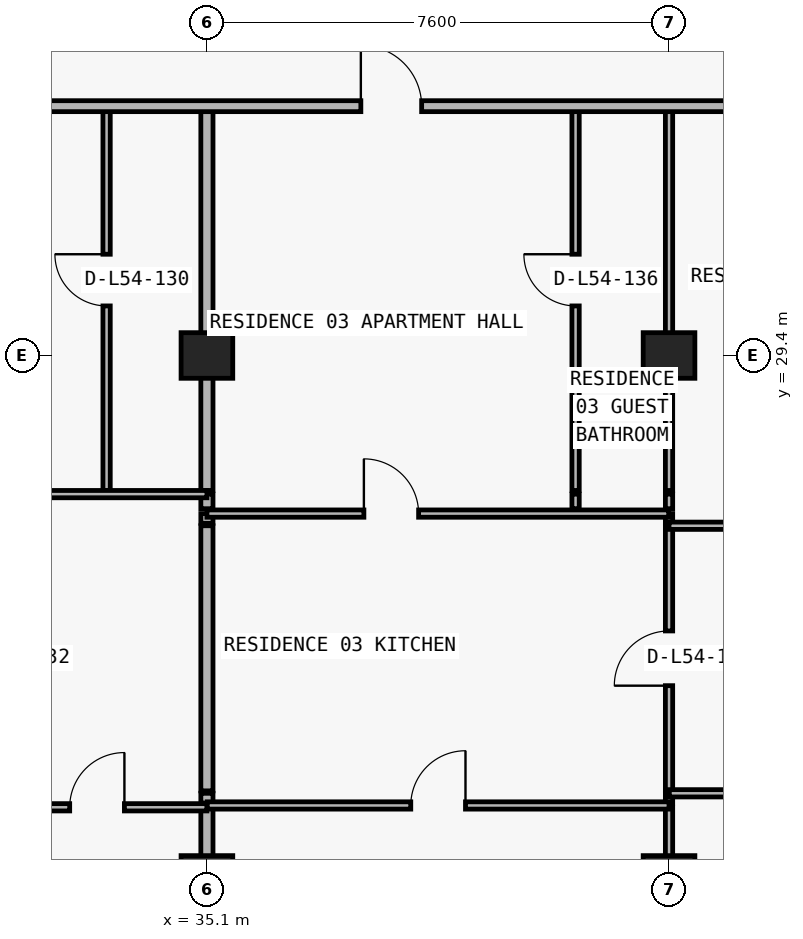
"""IFC4 building model, lengths in metres.
Left out: names, types, materials, properties, quantities, classifications, styles, units other than length and angle.
Written with IfcOpenShell. Run it as: python <this file> out.ifc"""

import sys

from ifc_helpers import new_model, si_unit, direction, frame, frame_2d, origin, origin_2d, place, context, subcontext, project, spatial, rectangle, extrude, element, fill, save


model = new_model("IFC4")
c1 = context("Model", 3, precision=1e-05, world=origin(), true_north=direction((0.0, 1.0)))
c2 = subcontext(c1, "Body", "Model", "MODEL_VIEW")
j1 = project(units=[si_unit("LENGTHUNIT", "METRE"), si_unit("PLANEANGLEUNIT", "RADIAN")], contexts=[c1])
p1 = place(None, origin())
s1 = spatial("IfcSite", under=j1, at=p1, CompositionType="ELEMENT")
p2 = place(p1, origin())
s2 = spatial("IfcBuilding", under=s1, at=p2, CompositionType="ELEMENT")
p3 = place(p2, frame((0.0, 0.0, 195.0)))
s3 = spatial("IfcBuildingStorey", under=s2, at=p3, CompositionType="ELEMENT", Elevation=195.0)
for number, where, z_axis, x_axis in (
    (1, (35.1, 20.8, 0.0), (0.0, 0.0, 1.0), (1.0, 0.0, 0.0)),
    (2, (42.7, 20.8, 0.0), (0.0, 0.0, 1.0), (1.0, 0.0, 0.0)),
    (3, (35.1, 29.4, 0.0), (0.0, 0.0, 1.0), (1.0, 0.0, 0.0)),
    (4, (42.7, 29.4, 0.0), (0.0, 0.0, 1.0), (1.0, 0.0, 0.0)),
):
    element("IfcColumn", number, at=place(p3, frame(where, z_axis=z_axis, x_axis=x_axis)), inside=s3, PredefinedType="COLUMN", context=c2, shape_type="SweptSolid", body=[
        extrude(rectangle(XDim=0.85, YDim=0.75, at=origin_2d()), origin(), (0.0, 0.0, 1.0), 3.05),
    ])
p4 = place(p3, frame((33.45, 27.18, 0.0), z_axis=(0.0, 0.0, 1.0), x_axis=(0.0, 1.0, 0.0)))
e5 = element("IfcWall", 5, at=p4, inside=s3, PredefinedType="PARTITIONING", context=c2, shape_type="SweptSolid", body=[
    extrude(rectangle(XDim=6.32, YDim=0.12, at=frame_2d((3.16, 0.0))), origin(), (0.0, 0.0, 1.0), 3.05),
])
p5 = place(p4, frame((3.035, 0.0, 0.0)))
e6 = element("IfcOpeningElement", 6, at=p5, cuts=e5, PredefinedType="OPENING", context=c2, shape_type="SweptSolid", body=[
    extrude(rectangle(XDim=0.85, YDim=2.1, at=frame_2d((0.425, 1.05))), frame((0.0, 0.07, 0.0), z_axis=(0.0, -1.0, 0.0), x_axis=(1.0, 0.0, 0.0)), (0.0, 0.0, 1.0), 0.14),
])
p6 = place(p3, frame((35.1, 11.24, 0.0), z_axis=(0.0, 0.0, 1.0), x_axis=(0.0, 1.0, 0.0)))
e7 = element("IfcWall", 7, at=p6, inside=s3, PredefinedType="PARTITIONING", context=c2, shape_type="SweptSolid", body=[
    extrude(rectangle(XDim=10.73, YDim=0.2, at=frame_2d((5.365, 0.0))), origin(), (0.0, 0.0, 1.0), 2.263),
])
p7 = place(p3, frame((35.1, 22.04, 0.0), z_axis=(0.0, 0.0, 1.0), x_axis=(0.0, 1.0, 0.0)))
e8 = element("IfcWall", 8, at=p7, inside=s3, PredefinedType="PARTITIONING", context=c2, shape_type="SweptSolid", body=[
    extrude(rectangle(XDim=0.16, YDim=0.2, at=frame_2d((0.08, 0.0))), origin(), (0.0, 0.0, 1.0), 2.263),
])
p8 = place(p3, frame((35.1, 22.24, 0.0), z_axis=(0.0, 0.0, 1.0), x_axis=(0.0, 1.0, 0.0)))
e9 = element("IfcWall", 9, at=p8, inside=s3, PredefinedType="PARTITIONING", context=c2, shape_type="SweptSolid", body=[
    extrude(rectangle(XDim=4.36, YDim=0.2, at=frame_2d((2.18, 0.0))), origin(), (0.0, 0.0, 1.0), 2.263),
])
p9 = place(p3, frame((35.1, 26.64, 0.0), z_axis=(0.0, 0.0, 1.0), x_axis=(0.0, 1.0, 0.0)))
e10 = element("IfcWall", 10, at=p9, inside=s3, PredefinedType="PARTITIONING", context=c2, shape_type="SweptSolid", body=[
    extrude(rectangle(XDim=0.16, YDim=0.2, at=frame_2d((0.08, 0.0))), origin(), (0.0, 0.0, 1.0), 2.263),
])
p10 = place(p3, frame((35.1, 26.88, 0.0), z_axis=(0.0, 0.0, 1.0), x_axis=(0.0, 1.0, 0.0)))
e11 = element("IfcWall", 11, at=p10, inside=s3, PredefinedType="PARTITIONING", context=c2, shape_type="SweptSolid", body=[
    extrude(rectangle(XDim=0.24, YDim=0.2, at=frame_2d((0.12, 0.0))), origin(), (0.0, 0.0, 1.0), 2.263),
])
p11 = place(p3, frame((35.1, 27.18, 0.0), z_axis=(0.0, 0.0, 1.0), x_axis=(0.0, 1.0, 0.0)))
e12 = element("IfcWall", 12, at=p11, inside=s3, PredefinedType="PARTITIONING", context=c2, shape_type="SweptSolid", body=[
    extrude(rectangle(XDim=6.32, YDim=0.2, at=frame_2d((3.16, 0.0))), origin(), (0.0, 0.0, 1.0), 2.263),
])
p12 = place(p3, frame((41.163, 26.88, 0.0), z_axis=(0.0, 0.0, 1.0), x_axis=(0.0, 1.0, 0.0)))
e13 = element("IfcWall", 13, at=p12, inside=s3, PredefinedType="PARTITIONING", context=c2, shape_type="SweptSolid", body=[
    extrude(rectangle(XDim=0.24, YDim=0.12, at=frame_2d((0.12, 0.0))), origin(), (0.0, 0.0, 1.0), 3.05),
])
p13 = place(p3, frame((41.163, 27.18, 0.0), z_axis=(0.0, 0.0, 1.0), x_axis=(0.0, 1.0, 0.0)))
e14 = element("IfcWall", 14, at=p13, inside=s3, PredefinedType="PARTITIONING", context=c2, shape_type="SweptSolid", body=[
    extrude(rectangle(XDim=6.32, YDim=0.12, at=frame_2d((3.16, 0.0))), origin(), (0.0, 0.0, 1.0), 3.05),
])
p14 = place(p13, frame((3.035, 0.0, 0.0)))
e15 = element("IfcOpeningElement", 15, at=p14, cuts=e14, PredefinedType="OPENING", context=c2, shape_type="SweptSolid", body=[
    extrude(rectangle(XDim=0.85, YDim=2.1, at=frame_2d((0.425, 1.05))), frame((0.0, 0.07, 0.0), z_axis=(0.0, -1.0, 0.0), x_axis=(1.0, 0.0, 0.0)), (0.0, 0.0, 1.0), 0.14),
])
p15 = place(p3, frame((42.7, 11.24, 0.0), z_axis=(0.0, 0.0, 1.0), x_axis=(0.0, 1.0, 0.0)))
e16 = element("IfcWall", 16, at=p15, inside=s3, PredefinedType="PARTITIONING", context=c2, shape_type="SweptSolid", body=[
    extrude(rectangle(XDim=10.73, YDim=0.12, at=frame_2d((5.365, 0.0))), origin(), (0.0, 0.0, 1.0), 2.263),
])
p16 = place(p3, frame((42.7, 22.04, 0.0), z_axis=(0.0, 0.0, 1.0), x_axis=(0.0, 1.0, 0.0)))
e17 = element("IfcWall", 17, at=p16, inside=s3, PredefinedType="PARTITIONING", context=c2, shape_type="SweptSolid", body=[
    extrude(rectangle(XDim=0.16, YDim=0.12, at=frame_2d((0.08, 0.0))), origin(), (0.0, 0.0, 1.0), 2.263),
])
p17 = place(p3, frame((42.7, 22.24, 0.0), z_axis=(0.0, 0.0, 1.0), x_axis=(0.0, 1.0, 0.0)))
e18 = element("IfcWall", 18, at=p17, inside=s3, PredefinedType="PARTITIONING", context=c2, shape_type="SweptSolid", body=[
    extrude(rectangle(XDim=4.36, YDim=0.12, at=frame_2d((2.18, 0.0))), origin(), (0.0, 0.0, 1.0), 2.263),
])
p18 = place(p17, frame((1.73, 0.0, 0.0)))
e19 = element("IfcOpeningElement", 19, at=p18, cuts=e18, PredefinedType="OPENING", context=c2, shape_type="SweptSolid", body=[
    extrude(rectangle(XDim=0.9, YDim=2.15, at=frame_2d((0.45, 1.075))), frame((0.0, 0.07, 0.0), z_axis=(0.0, -1.0, 0.0), x_axis=(1.0, 0.0, 0.0)), (0.0, 0.0, 1.0), 0.14),
])
p19 = place(p3, frame((42.7, 26.64, 0.0), z_axis=(0.0, 0.0, 1.0), x_axis=(0.0, 1.0, 0.0)))
e20 = element("IfcWall", 20, at=p19, inside=s3, PredefinedType="PARTITIONING", context=c2, shape_type="SweptSolid", body=[
    extrude(rectangle(XDim=0.16, YDim=0.12, at=frame_2d((0.08, 0.0))), origin(), (0.0, 0.0, 1.0), 2.263),
])
p20 = place(p3, frame((42.7, 26.88, 0.0), z_axis=(0.0, 0.0, 1.0), x_axis=(0.0, 1.0, 0.0)))
e21 = element("IfcWall", 21, at=p20, inside=s3, PredefinedType="PARTITIONING", context=c2, shape_type="SweptSolid", body=[
    extrude(rectangle(XDim=0.24, YDim=0.12, at=frame_2d((0.12, 0.0))), origin(), (0.0, 0.0, 1.0), 2.263),
])
p21 = place(p3, frame((42.7, 27.18, 0.0), z_axis=(0.0, 0.0, 1.0), x_axis=(0.0, 1.0, 0.0)))
e22 = element("IfcWall", 22, at=p21, inside=s3, PredefinedType="PARTITIONING", context=c2, shape_type="SweptSolid", body=[
    extrude(rectangle(XDim=6.32, YDim=0.12, at=frame_2d((3.16, 0.0))), origin(), (0.0, 0.0, 1.0), 2.263),
])
p22 = place(p3, frame((26.92, 21.97, 0.0), z_axis=(0.0, 0.0, 1.0), x_axis=(1.0, 0.0, 0.0)))
e23 = element("IfcWall", 23, at=p22, inside=s3, PredefinedType="PARTITIONING", context=c2, shape_type="SweptSolid", body=[
    extrude(rectangle(XDim=8.18, YDim=0.12, at=frame_2d((4.09, 0.0))), origin(), (0.0, 0.0, 1.0), 3.05),
])
p23 = place(p22, frame((1.75, 0.0, 0.0)))
e24 = element("IfcOpeningElement", 24, at=p23, cuts=e23, PredefinedType="OPENING", context=c2, shape_type="SweptSolid", body=[
    extrude(rectangle(XDim=0.9, YDim=2.15, at=frame_2d((0.45, 1.075))), frame((0.0, 0.07, 0.0), z_axis=(0.0, -1.0, 0.0), x_axis=(1.0, 0.0, 0.0)), (0.0, 0.0, 1.0), 0.14),
])
p24 = place(p22, frame((5.923, 0.0, 0.0)))
e25 = element("IfcOpeningElement", 25, at=p24, cuts=e23, PredefinedType="OPENING", context=c2, shape_type="SweptSolid", body=[
    extrude(rectangle(XDim=0.9, YDim=2.15, at=frame_2d((0.45, 1.075))), frame((0.0, 0.07, 0.0), z_axis=(0.0, -1.0, 0.0), x_axis=(1.0, 0.0, 0.0)), (0.0, 0.0, 1.0), 0.14),
])
p25 = place(p3, frame((35.105, 22.0, 0.0), z_axis=(0.0, 0.0, 1.0), x_axis=(1.0, 0.0, 0.0)))
e26 = element("IfcWall", 26, at=p25, inside=s3, PredefinedType="PARTITIONING", context=c2, shape_type="SweptSolid", body=[
    extrude(rectangle(XDim=7.595, YDim=0.12, at=frame_2d((3.797, 0.0))), origin(), (0.0, 0.0, 1.0), 3.05),
])
p26 = place(p25, frame((3.347, 0.0, 0.0)))
e27 = element("IfcOpeningElement", 27, at=p26, cuts=e26, PredefinedType="OPENING", context=c2, shape_type="SweptSolid", body=[
    extrude(rectangle(XDim=0.9, YDim=2.15, at=frame_2d((0.45, 1.075))), frame((0.0, 0.07, 0.0), z_axis=(0.0, -1.0, 0.0), x_axis=(1.0, 0.0, 0.0)), (0.0, 0.0, 1.0), 0.14),
])
p27 = place(p3, frame((42.705, 22.2, 0.0), z_axis=(0.0, 0.0, 1.0), x_axis=(1.0, 0.0, 0.0)))
e28 = element("IfcWall", 28, at=p27, inside=s3, PredefinedType="PARTITIONING", context=c2, shape_type="SweptSolid", body=[
    extrude(rectangle(XDim=8.175, YDim=0.12, at=frame_2d((4.087, 0.0))), origin(), (0.0, 0.0, 1.0), 3.05),
])
p28 = place(p27, frame((3.637, 0.0, 0.0)))
e29 = element("IfcOpeningElement", 29, at=p28, cuts=e28, PredefinedType="OPENING", context=c2, shape_type="SweptSolid", body=[
    extrude(rectangle(XDim=0.9, YDim=2.15, at=frame_2d((0.45, 1.075))), frame((0.0, 0.07, 0.0), z_axis=(0.0, -1.0, 0.0), x_axis=(1.0, 0.0, 0.0)), (0.0, 0.0, 1.0), 0.14),
])
p29 = place(p3, frame((42.7, 26.6, 0.0), z_axis=(0.0, 0.0, 1.0), x_axis=(1.0, 0.0, 0.0)))
e30 = element("IfcWall", 30, at=p29, inside=s3, PredefinedType="PARTITIONING", context=c2, shape_type="SweptSolid", body=[
    extrude(rectangle(XDim=8.18, YDim=0.12, at=frame_2d((4.09, 0.0))), origin(), (0.0, 0.0, 1.0), 3.05),
])
p30 = place(p29, frame((3.0, 0.0, 0.0)))
e31 = element("IfcOpeningElement", 31, at=p30, cuts=e30, PredefinedType="OPENING", context=c2, shape_type="SweptSolid", body=[
    extrude(rectangle(XDim=0.9, YDim=2.15, at=frame_2d((0.45, 1.075))), frame((0.0, 0.07, 0.0), z_axis=(0.0, -1.0, 0.0), x_axis=(1.0, 0.0, 0.0)), (0.0, 0.0, 1.0), 0.14),
])
p31 = place(p3, frame((35.1, 26.8, 0.0), z_axis=(0.0, 0.0, 1.0), x_axis=(1.0, 0.0, 0.0)))
e32 = element("IfcWall", 32, at=p31, inside=s3, PredefinedType="PARTITIONING", context=c2, shape_type="SweptSolid", body=[
    extrude(rectangle(XDim=7.595, YDim=0.12, at=frame_2d((3.797, 0.0))), origin(), (0.0, 0.0, 1.0), 3.05),
])
p32 = place(p31, frame((2.582, 0.0, 0.0)))
e33 = element("IfcOpeningElement", 33, at=p32, cuts=e32, PredefinedType="OPENING", context=c2, shape_type="SweptSolid", body=[
    extrude(rectangle(XDim=0.9, YDim=2.15, at=frame_2d((0.45, 1.075))), frame((0.0, 0.07, 0.0), z_axis=(0.0, -1.0, 0.0), x_axis=(1.0, 0.0, 0.0)), (0.0, 0.0, 1.0), 0.14),
])
p33 = place(p3, frame((26.92, 27.12, 0.0), z_axis=(0.0, 0.0, 1.0), x_axis=(1.0, 0.0, 0.0)))
e34 = element("IfcWall", 34, at=p33, inside=s3, PredefinedType="PARTITIONING", context=c2, shape_type="SweptSolid", body=[
    extrude(rectangle(XDim=8.18, YDim=0.12, at=frame_2d((4.09, 0.0))), origin(), (0.0, 0.0, 1.0), 3.05),
])
p34 = place(p33, frame((1.833, 0.0, 0.0)))
e35 = element("IfcOpeningElement", 35, at=p34, cuts=e34, PredefinedType="OPENING", context=c2, shape_type="SweptSolid", body=[
    extrude(rectangle(XDim=0.9, YDim=2.15, at=frame_2d((0.45, 1.075))), frame((0.0, 0.07, 0.0), z_axis=(0.0, -1.0, 0.0), x_axis=(1.0, 0.0, 0.0)), (0.0, 0.0, 1.0), 0.14),
])
p35 = place(p3, frame((10.105, 33.5, 0.0), z_axis=(0.0, 0.0, 1.0), x_axis=(1.0, 0.0, 0.0)))
e36 = element("IfcWall", 36, at=p35, inside=s3, PredefinedType="PARTITIONING", context=c2, shape_type="SweptSolid", body=[
    extrude(rectangle(XDim=57.595, YDim=0.18, at=frame_2d((28.797, 0.0))), origin(), (0.0, 0.0, 1.0), 3.05),
])
p36 = place(p35, frame((2.824, 0.0, 0.0)))
e37 = element("IfcOpeningElement", 37, at=p36, cuts=e36, PredefinedType="OPENING", context=c2, shape_type="SweptSolid", body=[
    extrude(rectangle(XDim=1.0, YDim=2.2, at=frame_2d((0.5, 1.1))), frame((0.0, 0.1, 0.0), z_axis=(0.0, -1.0, 0.0), x_axis=(1.0, 0.0, 0.0)), (0.0, 0.0, 1.0), 0.2),
])
p37 = place(p35, frame((19.47, 0.0, 0.0)))
e38 = element("IfcOpeningElement", 38, at=p37, cuts=e36, PredefinedType="OPENING", context=c2, shape_type="SweptSolid", body=[
    extrude(rectangle(XDim=1.0, YDim=2.2, at=frame_2d((0.5, 1.1))), frame((0.0, 0.1, 0.0), z_axis=(0.0, -1.0, 0.0), x_axis=(1.0, 0.0, 0.0)), (0.0, 0.0, 1.0), 0.2),
])
p38 = place(p35, frame((27.527, 0.0, 0.0)))
e39 = element("IfcOpeningElement", 39, at=p38, cuts=e36, PredefinedType="OPENING", context=c2, shape_type="SweptSolid", body=[
    extrude(rectangle(XDim=1.0, YDim=2.2, at=frame_2d((0.5, 1.1))), frame((0.0, 0.1, 0.0), z_axis=(0.0, -1.0, 0.0), x_axis=(1.0, 0.0, 0.0)), (0.0, 0.0, 1.0), 0.2),
])
p39 = place(p35, frame((43.87, 0.0, 0.0)))
e40 = element("IfcOpeningElement", 40, at=p39, cuts=e36, PredefinedType="OPENING", context=c2, shape_type="SweptSolid", body=[
    extrude(rectangle(XDim=1.0, YDim=2.2, at=frame_2d((0.5, 1.1))), frame((0.0, 0.1, 0.0), z_axis=(0.0, -1.0, 0.0), x_axis=(1.0, 0.0, 0.0)), (0.0, 0.0, 1.0), 0.2),
])
p40 = place(p35, frame((52.17, 0.0, 0.0)))
e41 = element("IfcOpeningElement", 41, at=p40, cuts=e36, PredefinedType="OPENING", context=c2, shape_type="SweptSolid", body=[
    extrude(rectangle(XDim=1.0, YDim=2.2, at=frame_2d((0.5, 1.1))), frame((0.0, 0.1, 0.0), z_axis=(0.0, -1.0, 0.0), x_axis=(1.0, 0.0, 0.0)), (0.0, 0.0, 1.0), 0.2),
])
p41 = place(p5, origin())
e42 = element("IfcDoor", 42, at=p41, inside=s3, OperationType="SINGLE_SWING_RIGHT", PredefinedType="DOOR", context=c2, shape_type="SweptSolid", body=[
    extrude(rectangle(XDim=0.85, YDim=2.1, at=frame_2d((0.425, 1.05))), frame((0.0, 0.025, 0.0), z_axis=(0.0, -1.0, 0.0), x_axis=(1.0, 0.0, 0.0)), (0.0, 0.0, 1.0), 0.05),
])
fill(e6, e42)
p42 = place(p24, origin())
e43 = element("IfcDoor", 43, at=p42, inside=s3, OperationType="SINGLE_SWING_RIGHT", PredefinedType="DOOR", context=c2, shape_type="SweptSolid", body=[
    extrude(rectangle(XDim=0.9, YDim=2.15, at=frame_2d((0.45, 1.075))), frame((0.0, 0.025, 0.0), z_axis=(0.0, -1.0, 0.0), x_axis=(1.0, 0.0, 0.0)), (0.0, 0.0, 1.0), 0.05),
])
fill(e25, e43)
p43 = place(p38, origin())
e44 = element("IfcDoor", 44, at=p43, inside=s3, OperationType="SINGLE_SWING_LEFT", PredefinedType="DOOR", context=c2, shape_type="SweptSolid", body=[
    extrude(rectangle(XDim=1.0, YDim=2.2, at=frame_2d((0.5, 1.1))), frame((0.0, 0.025, 0.0), z_axis=(0.0, -1.0, 0.0), x_axis=(1.0, 0.0, 0.0)), (0.0, 0.0, 1.0), 0.05),
])
fill(e39, e44)
p44 = place(p14, origin())
e45 = element("IfcDoor", 45, at=p44, inside=s3, OperationType="SINGLE_SWING_RIGHT", PredefinedType="DOOR", context=c2, shape_type="SweptSolid", body=[
    extrude(rectangle(XDim=0.85, YDim=2.1, at=frame_2d((0.425, 1.05))), frame((0.0, 0.025, 0.0), z_axis=(0.0, -1.0, 0.0), x_axis=(1.0, 0.0, 0.0)), (0.0, 0.0, 1.0), 0.05),
])
fill(e15, e45)
p45 = place(p32, origin())
e46 = element("IfcDoor", 46, at=p45, inside=s3, OperationType="SINGLE_SWING_LEFT", PredefinedType="DOOR", context=c2, shape_type="SweptSolid", body=[
    extrude(rectangle(XDim=0.9, YDim=2.15, at=frame_2d((0.45, 1.075))), frame((0.0, 0.025, 0.0), z_axis=(0.0, -1.0, 0.0), x_axis=(1.0, 0.0, 0.0)), (0.0, 0.0, 1.0), 0.05),
])
fill(e33, e46)
p46 = place(p26, origin())
e47 = element("IfcDoor", 47, at=p46, inside=s3, OperationType="SINGLE_SWING_RIGHT", PredefinedType="DOOR", context=c2, shape_type="SweptSolid", body=[
    extrude(rectangle(XDim=0.9, YDim=2.15, at=frame_2d((0.45, 1.075))), frame((0.0, 0.025, 0.0), z_axis=(0.0, -1.0, 0.0), x_axis=(1.0, 0.0, 0.0)), (0.0, 0.0, 1.0), 0.05),
])
fill(e27, e47)
p47 = place(p18, origin())
e48 = element("IfcDoor", 48, at=p47, inside=s3, OperationType="SINGLE_SWING_LEFT", PredefinedType="DOOR", context=c2, shape_type="SweptSolid", body=[
    extrude(rectangle(XDim=0.9, YDim=2.15, at=frame_2d((0.45, 1.075))), frame((0.0, 0.025, 0.0), z_axis=(0.0, -1.0, 0.0), x_axis=(1.0, 0.0, 0.0)), (0.0, 0.0, 1.0), 0.05),
])
fill(e19, e48)
save(model, sys.argv[1])
